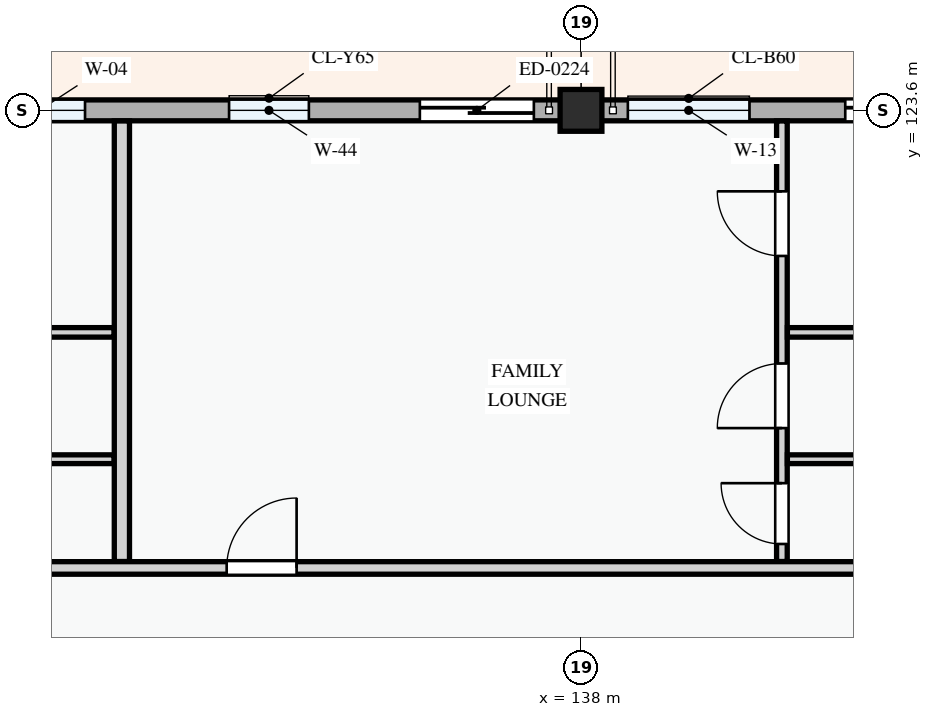
"""IFC4 building model, lengths in metres.
Left out: names, types, materials, properties, quantities, classifications, styles, units other than length and angle.
Written with IfcOpenShell. Run it as: python <this file> out.ifc"""

import sys

from ifc_helpers import new_model, si_unit, direction, frame, frame_2d, origin, origin_2d, place, context, subcontext, project, spatial, rectangle, extrude, element, fill, save


model = new_model("IFC4")
c1 = context("Model", 3, precision=1e-05, world=origin(), true_north=direction((0.0, 1.0)))
c2 = subcontext(c1, "Body", "Model", "MODEL_VIEW")
j1 = project(units=[si_unit("LENGTHUNIT", "METRE"), si_unit("PLANEANGLEUNIT", "RADIAN")], contexts=[c1])
p1 = place(None, origin())
s1 = spatial("IfcSite", under=j1, at=p1, CompositionType="ELEMENT")
p2 = place(p1, origin())
s2 = spatial("IfcBuilding", under=s1, at=p2, CompositionType="ELEMENT")
p3 = place(p2, frame((0.0, 0.0, 27.9)))
s3 = spatial("IfcBuildingStorey", under=s2, at=p3, CompositionType="ELEMENT", Elevation=27.9)
p4 = place(p3, frame((138.0, 123.6, 0.0), z_axis=(0.0, 0.0, 1.0), x_axis=(1.0, 0.0, 0.0)))
e1 = element("IfcColumn", 1, at=p4, inside=s3, PredefinedType="COLUMN", context=c2, shape_type="SweptSolid", body=[
    extrude(rectangle(XDim=0.55, YDim=0.55, at=origin_2d()), origin(), (0.0, 0.0, 1.0), 3.3),
])
p5 = place(p3, frame((144.0, 123.6, 0.0), z_axis=(0.0, 0.0, 1.0), x_axis=(-1.0, 0.0, 0.0)))
e2 = element("IfcWall", 2, at=p5, inside=s3, PredefinedType="STANDARD", context=c2, shape_type="SweptSolid", body=[
    extrude(rectangle(XDim=6.0, YDim=0.275, at=frame_2d((3.0, 0.0))), origin(), (0.0, 0.0, 1.0), 2.445),
])
p6 = place(p5, frame((1.123, 0.0, 0.0)))
e3 = element("IfcOpeningElement", 3, at=p6, cuts=e2, PredefinedType="OPENING", context=c2, shape_type="SweptSolid", body=[
    extrude(rectangle(XDim=1.4, YDim=2.2, at=frame_2d((0.7, 1.1))), frame((0.0, 0.147, 0.0), z_axis=(0.0, -1.0, 0.0), x_axis=(1.0, 0.0, 0.0)), (0.0, 0.0, 1.0), 0.295),
])
p7 = place(p5, frame((3.783, 0.0, 0.78)))
e4 = element("IfcOpeningElement", 4, at=p7, cuts=e2, PredefinedType="OPENING", context=c2, shape_type="SweptSolid", body=[
    extrude(rectangle(XDim=1.6, YDim=1.55, at=frame_2d((0.8, 0.775))), frame((0.0, 0.147, 0.0), z_axis=(0.0, -1.0, 0.0), x_axis=(1.0, 0.0, 0.0)), (0.0, 0.0, 1.0), 0.295),
])
p8 = place(p3, frame((138.0, 123.6, 0.0), z_axis=(0.0, 0.0, 1.0), x_axis=(-1.0, 0.0, 0.0)))
e5 = element("IfcWall", 5, at=p8, inside=s3, PredefinedType="STANDARD", context=c2, shape_type="SweptSolid", body=[
    extrude(rectangle(XDim=8.4, YDim=0.275, at=frame_2d((4.2, 0.0))), origin(), (0.0, 0.0, 1.0), 2.345),
])
p9 = place(p8, frame((0.62, 0.0, 0.0)))
e6 = element("IfcOpeningElement", 6, at=p9, cuts=e5, PredefinedType="OPENING", context=c2, shape_type="SweptSolid", body=[
    extrude(rectangle(XDim=1.5, YDim=2.2, at=frame_2d((0.75, 1.1))), frame((0.0, 0.147, 0.0), z_axis=(0.0, -1.0, 0.0), x_axis=(1.0, 0.0, 0.0)), (0.0, 0.0, 1.0), 0.295),
])
p10 = place(p8, frame((3.58, 0.0, 0.78)))
e7 = element("IfcOpeningElement", 7, at=p10, cuts=e5, PredefinedType="OPENING", context=c2, shape_type="SweptSolid", body=[
    extrude(rectangle(XDim=1.05, YDim=1.2, at=frame_2d((0.525, 0.6))), frame((0.0, 0.147, 0.0), z_axis=(0.0, -1.0, 0.0), x_axis=(1.0, 0.0, 0.0)), (0.0, 0.0, 1.0), 0.295),
])
p11 = place(p8, frame((6.525, 0.0, 0.78)))
e8 = element("IfcOpeningElement", 8, at=p11, cuts=e5, PredefinedType="OPENING", context=c2, shape_type="SweptSolid", body=[
    extrude(rectangle(XDim=1.2, YDim=1.35, at=frame_2d((0.6, 0.675))), frame((0.0, 0.147, 0.0), z_axis=(0.0, -1.0, 0.0), x_axis=(1.0, 0.0, 0.0)), (0.0, 0.0, 1.0), 0.295),
])
p12 = place(p3, frame((119.001, 120.679, 0.0), z_axis=(0.0, 0.0, 1.0), x_axis=(1.0, 0.0, 0.0)))
e9 = element("IfcWall", 9, at=p12, inside=s3, PredefinedType="PARTITIONING", context=c2, shape_type="SweptSolid", body=[
    extrude(rectangle(XDim=12.857, YDim=0.125, at=frame_2d((6.429, 0.0))), origin(), (0.0, 0.0, 1.0), 3.0),
])
p13 = place(p3, frame((119.001, 119.01, 0.0), z_axis=(0.0, 0.0, 1.0), x_axis=(1.0, 0.0, 0.0)))
e10 = element("IfcWall", 10, at=p13, inside=s3, PredefinedType="PARTITIONING", context=c2, shape_type="SweptSolid", body=[
    extrude(rectangle(XDim=12.857, YDim=0.115, at=frame_2d((6.429, 0.0))), origin(), (0.0, 0.0, 1.0), 3.0),
])
p14 = place(p3, frame((140.643, 117.665, 0.0), z_axis=(0.0, 0.0, 1.0), x_axis=(0.0, 1.0, 0.0)))
e11 = element("IfcWall", 11, at=p14, inside=s3, PredefinedType="PARTITIONING", context=c2, shape_type="SweptSolid", body=[
    extrude(rectangle(XDim=5.796, YDim=0.14, at=frame_2d((2.898, 0.0))), origin(), (0.0, 0.0, 1.0), 3.0),
])
p15 = place(p14, frame((0.231, 0.0, 0.0)))
e12 = element("IfcOpeningElement", 12, at=p15, cuts=e11, PredefinedType="OPENING", context=c2, shape_type="SweptSolid", body=[
    extrude(rectangle(XDim=0.8, YDim=2.1, at=frame_2d((0.4, 1.05))), frame((0.0, 0.08, 0.0), z_axis=(0.0, -1.0, 0.0), x_axis=(1.0, 0.0, 0.0)), (0.0, 0.0, 1.0), 0.16),
])
p16 = place(p14, frame((1.755, 0.0, 0.0)))
e13 = element("IfcOpeningElement", 13, at=p16, cuts=e11, PredefinedType="OPENING", context=c2, shape_type="SweptSolid", body=[
    extrude(rectangle(XDim=0.85, YDim=2.1, at=frame_2d((0.425, 1.05))), frame((0.0, 0.08, 0.0), z_axis=(0.0, -1.0, 0.0), x_axis=(1.0, 0.0, 0.0)), (0.0, 0.0, 1.0), 0.16),
])
p17 = place(p14, frame((4.02, 0.0, 0.0)))
e14 = element("IfcOpeningElement", 14, at=p17, cuts=e11, PredefinedType="OPENING", context=c2, shape_type="SweptSolid", body=[
    extrude(rectangle(XDim=0.85, YDim=2.1, at=frame_2d((0.425, 1.05))), frame((0.0, 0.08, 0.0), z_axis=(0.0, -1.0, 0.0), x_axis=(1.0, 0.0, 0.0)), (0.0, 0.0, 1.0), 0.16),
])
p18 = place(p3, frame((140.715, 120.679, 0.0), z_axis=(0.0, 0.0, 1.0), x_axis=(1.0, 0.0, 0.0)))
e15 = element("IfcWall", 15, at=p18, inside=s3, PredefinedType="PARTITIONING", context=c2, shape_type="SweptSolid", body=[
    extrude(rectangle(XDim=9.335, YDim=0.125, at=frame_2d((4.667, 0.0))), origin(), (0.0, 0.0, 1.0), 3.0),
])
p19 = place(p3, frame((140.715, 119.01, 0.0), z_axis=(0.0, 0.0, 1.0), x_axis=(1.0, 0.0, 0.0)))
e16 = element("IfcWall", 16, at=p19, inside=s3, PredefinedType="PARTITIONING", context=c2, shape_type="SweptSolid", body=[
    extrude(rectangle(XDim=9.335, YDim=0.115, at=frame_2d((4.667, 0.0))), origin(), (0.0, 0.0, 1.0), 3.0),
])
p20 = place(p3, frame((131.96, 117.665, 0.0), z_axis=(0.0, 0.0, 1.0), x_axis=(0.0, 1.0, 0.0)))
e17 = element("IfcWall", 17, at=p20, inside=s3, PredefinedType="PARTITIONING", context=c2, shape_type="SweptSolid", body=[
    extrude(rectangle(XDim=5.796, YDim=0.2, at=frame_2d((2.898, 0.0))), origin(), (0.0, 0.0, 1.0), 3.0),
])
p21 = place(p3, frame((80.54, 117.58, 0.0), z_axis=(0.0, 0.0, 1.0), x_axis=(1.0, 0.0, 0.0)))
e18 = element("IfcWall", 18, at=p21, inside=s3, PredefinedType="PARTITIONING", context=c2, shape_type="SweptSolid", body=[
    extrude(rectangle(XDim=72.0, YDim=0.165, at=frame_2d((36.0, 0.0))), origin(), (0.0, 0.0, 1.0), 3.0),
])
p22 = place(p21, frame((9.562, 0.0, 0.0)))
e19 = element("IfcOpeningElement", 19, at=p22, cuts=e18, PredefinedType="OPENING", context=c2, shape_type="SweptSolid", body=[
    extrude(rectangle(XDim=0.96, YDim=2.12, at=frame_2d((0.48, 1.06))), frame((0.0, 0.093, 0.0), z_axis=(0.0, -1.0, 0.0), x_axis=(1.0, 0.0, 0.0)), (0.0, 0.0, 1.0), 0.185),
])
p23 = place(p21, frame((37.179, 0.0, 0.0)))
e20 = element("IfcOpeningElement", 20, at=p23, cuts=e18, PredefinedType="OPENING", context=c2, shape_type="SweptSolid", body=[
    extrude(rectangle(XDim=0.92, YDim=2.1, at=frame_2d((0.46, 1.05))), frame((0.0, 0.093, 0.0), z_axis=(0.0, -1.0, 0.0), x_axis=(1.0, 0.0, 0.0)), (0.0, 0.0, 1.0), 0.185),
])
p24 = place(p21, frame((52.799, 0.0, 0.0)))
e21 = element("IfcOpeningElement", 21, at=p24, cuts=e18, PredefinedType="OPENING", context=c2, shape_type="SweptSolid", body=[
    extrude(rectangle(XDim=0.92, YDim=2.1, at=frame_2d((0.46, 1.05))), frame((0.0, 0.093, 0.0), z_axis=(0.0, -1.0, 0.0), x_axis=(1.0, 0.0, 0.0)), (0.0, 0.0, 1.0), 0.185),
])
p25 = place(p6, frame((1.4, 0.0, 0.0), z_axis=(0.0, 0.0, 1.0), x_axis=(-1.0, 0.0, 0.0)))
e22 = element("IfcDoor", 22, at=p25, inside=s3, OperationType="SLIDING_TO_LEFT", PredefinedType="DOOR", context=c2, shape_type="SweptSolid", body=[
    extrude(rectangle(XDim=1.4, YDim=2.2, at=frame_2d((0.7, 1.1))), frame((0.0, 0.025, 0.0), z_axis=(0.0, -1.0, 0.0), x_axis=(1.0, 0.0, 0.0)), (0.0, 0.0, 1.0), 0.05),
])
fill(e3, e22)
p26 = place(p7, origin())
e23 = element("IfcWindow", 23, at=p26, inside=s3, PartitioningType="DOUBLE_PANEL_VERTICAL", PredefinedType="WINDOW", context=c2, shape_type="SweptSolid", body=[
    extrude(rectangle(XDim=1.6, YDim=1.55, at=frame_2d((0.8, 0.775))), frame((0.0, 0.03, 0.0), z_axis=(0.0, -1.0, 0.0), x_axis=(1.0, 0.0, 0.0)), (0.0, 0.0, 1.0), 0.06),
])
fill(e4, e23)
p27 = place(p9, frame((1.5, 0.0, 0.0), z_axis=(0.0, 0.0, 1.0), x_axis=(-1.0, 0.0, 0.0)))
e24 = element("IfcDoor", 24, at=p27, inside=s3, OperationType="SLIDING_TO_RIGHT", PredefinedType="DOOR", context=c2, shape_type="SweptSolid", body=[
    extrude(rectangle(XDim=1.5, YDim=2.2, at=frame_2d((0.75, 1.1))), frame((0.0, 0.025, 0.0), z_axis=(0.0, -1.0, 0.0), x_axis=(1.0, 0.0, 0.0)), (0.0, 0.0, 1.0), 0.05),
])
fill(e6, e24)
p28 = place(p10, origin())
e25 = element("IfcWindow", 25, at=p28, inside=s3, PartitioningType="SINGLE_PANEL", PredefinedType="WINDOW", context=c2, shape_type="SweptSolid", body=[
    extrude(rectangle(XDim=1.05, YDim=1.2, at=frame_2d((0.525, 0.6))), frame((0.0, 0.03, 0.0), z_axis=(0.0, -1.0, 0.0), x_axis=(1.0, 0.0, 0.0)), (0.0, 0.0, 1.0), 0.06),
])
fill(e7, e25)
p29 = place(p11, origin())
e26 = element("IfcWindow", 26, at=p29, inside=s3, PartitioningType="SINGLE_PANEL", PredefinedType="WINDOW", context=c2, shape_type="SweptSolid", body=[
    extrude(rectangle(XDim=1.2, YDim=1.35, at=frame_2d((0.6, 0.675))), frame((0.0, 0.03, 0.0), z_axis=(0.0, -1.0, 0.0), x_axis=(1.0, 0.0, 0.0)), (0.0, 0.0, 1.0), 0.06),
])
fill(e8, e26)
p30 = place(p15, origin())
e27 = element("IfcDoor", 27, at=p30, inside=s3, OperationType="SINGLE_SWING_RIGHT", PredefinedType="DOOR", context=c2, shape_type="SweptSolid", body=[
    extrude(rectangle(XDim=0.8, YDim=2.1, at=frame_2d((0.4, 1.05))), frame((0.0, 0.025, 0.0), z_axis=(0.0, -1.0, 0.0), x_axis=(1.0, 0.0, 0.0)), (0.0, 0.0, 1.0), 0.05),
])
fill(e12, e27)
p31 = place(p16, origin())
e28 = element("IfcDoor", 28, at=p31, inside=s3, OperationType="SINGLE_SWING_LEFT", PredefinedType="DOOR", context=c2, shape_type="SweptSolid", body=[
    extrude(rectangle(XDim=0.85, YDim=2.1, at=frame_2d((0.425, 1.05))), frame((0.0, 0.025, 0.0), z_axis=(0.0, -1.0, 0.0), x_axis=(1.0, 0.0, 0.0)), (0.0, 0.0, 1.0), 0.05),
])
fill(e13, e28)
p32 = place(p17, origin())
e29 = element("IfcDoor", 29, at=p32, inside=s3, OperationType="SINGLE_SWING_RIGHT", PredefinedType="DOOR", context=c2, shape_type="SweptSolid", body=[
    extrude(rectangle(XDim=0.85, YDim=2.1, at=frame_2d((0.425, 1.05))), frame((0.0, 0.025, 0.0), z_axis=(0.0, -1.0, 0.0), x_axis=(1.0, 0.0, 0.0)), (0.0, 0.0, 1.0), 0.05),
])
fill(e14, e29)
p33 = place(p24, origin())
e30 = element("IfcDoor", 30, at=p33, inside=s3, OperationType="SINGLE_SWING_RIGHT", PredefinedType="DOOR", context=c2, shape_type="SweptSolid", body=[
    extrude(rectangle(XDim=0.92, YDim=2.1, at=frame_2d((0.46, 1.05))), frame((0.0, 0.025, 0.0), z_axis=(0.0, -1.0, 0.0), x_axis=(1.0, 0.0, 0.0)), (0.0, 0.0, 1.0), 0.05),
])
fill(e21, e30)
save(model, sys.argv[1])
